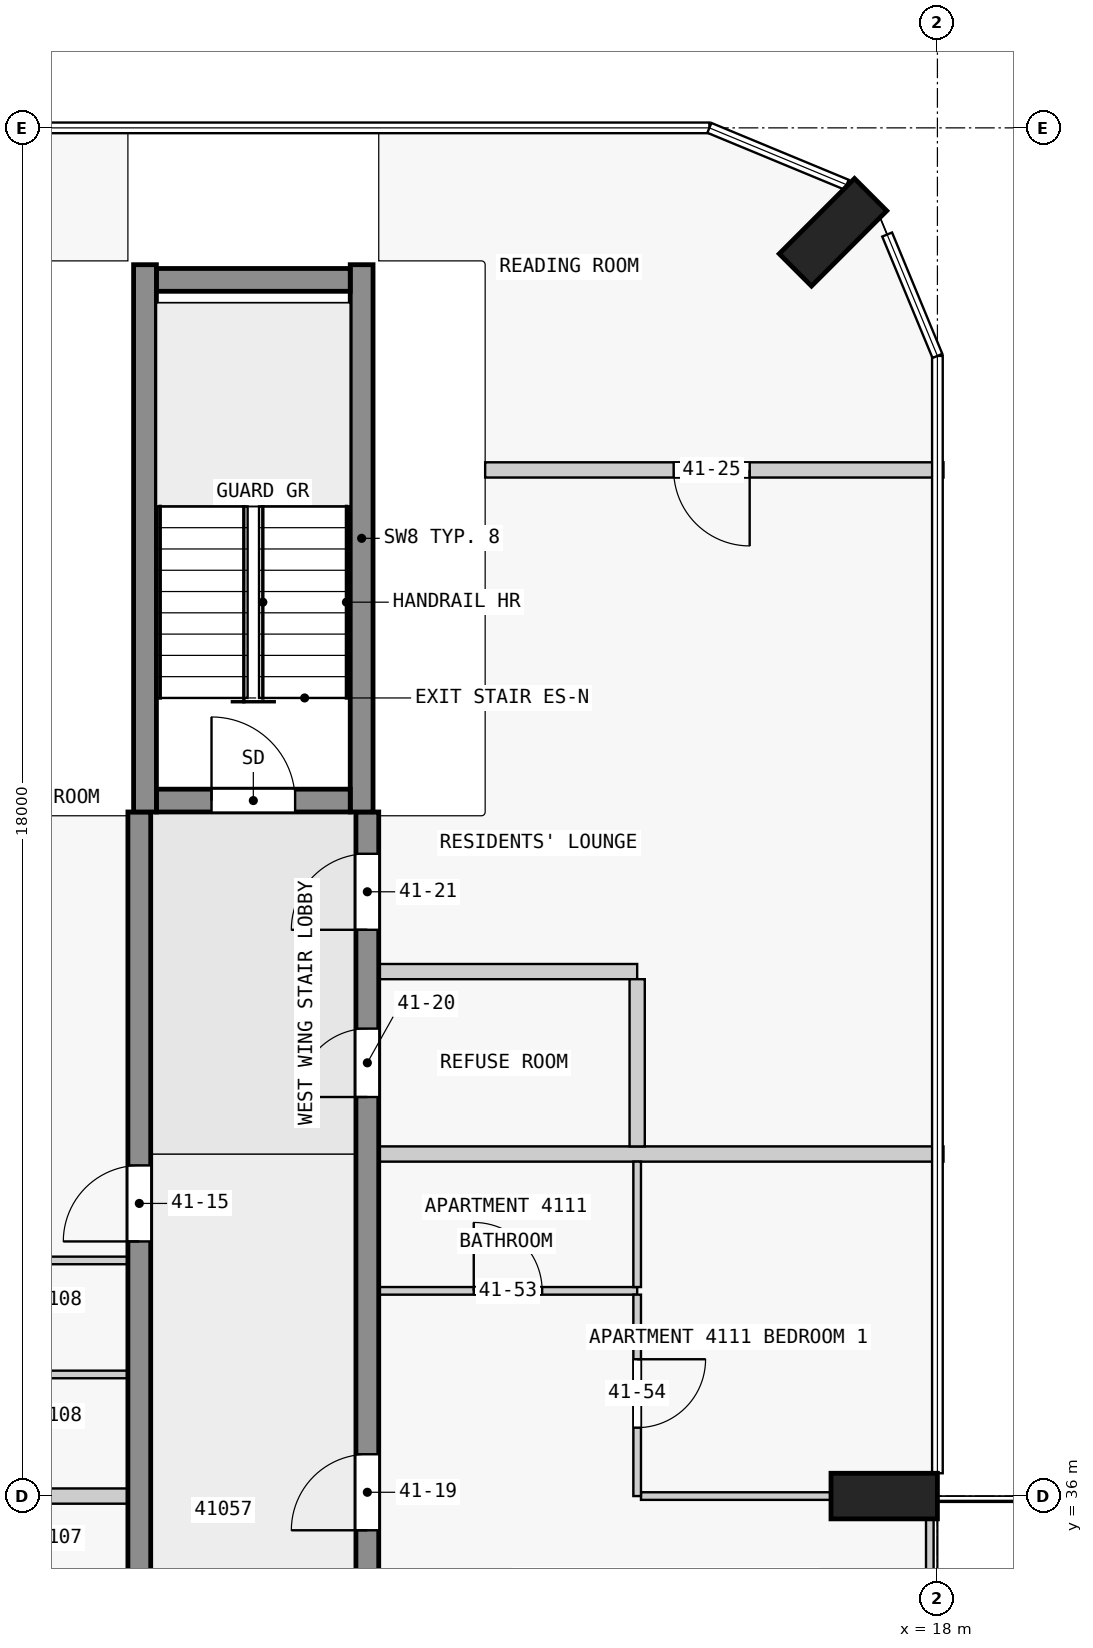
"""IFC4 building model, lengths in metres.
Left out: names, types, materials, properties, quantities, classifications, styles, units other than length and angle.
Written with IfcOpenShell. Run it as: python <this file> out.ifc"""

import sys

from ifc_helpers import new_model, si_unit, direction, frame, frame_2d, origin, origin_2d, place, context, subcontext, project, spatial, rectangle, extrude, element, fill, save


model = new_model("IFC4")
c1 = context("Model", 3, precision=1e-05, world=origin(), true_north=direction((0.0, 1.0)))
c2 = subcontext(c1, "Body", "Model", "MODEL_VIEW")
j1 = project(units=[si_unit("LENGTHUNIT", "METRE"), si_unit("PLANEANGLEUNIT", "RADIAN")], contexts=[c1])
p1 = place(None, origin())
s1 = spatial("IfcSite", under=j1, at=p1, CompositionType="ELEMENT")
p2 = place(p1, origin())
s2 = spatial("IfcBuilding", under=s1, at=p2, CompositionType="ELEMENT")
p3 = place(p2, frame((0.0, 0.0, 160.4)))
s3 = spatial("IfcBuildingStorey", under=s2, at=p3, CompositionType="ELEMENT", Elevation=160.4)
for number, where, z_axis, x_axis in (
    (1, (17.3, 36.0, 0.0), (0.0, 0.0, 1.0), (0.0, 1.0, 0.0)),
    (2, (16.626, 52.626, 0.0), (0.0, 0.0, 1.0), (-0.707, 0.707, 0.0)),
):
    element("IfcColumn", number, at=place(p3, frame(where, z_axis=z_axis, x_axis=x_axis)), inside=s3, PredefinedType="COLUMN", context=c2, shape_type="SweptSolid", body=[
        extrude(rectangle(XDim=0.6, YDim=1.4, at=origin_2d()), origin(), (0.0, 0.0, 1.0), 3.5),
    ])
p4 = place(p3, frame((7.725, 45.15, 0.0), z_axis=(0.0, 0.0, 1.0), x_axis=(1.0, 0.0, 0.0)))
e3 = element("IfcWall", 3, at=p4, inside=s3, PredefinedType="SHEAR", context=c2, shape_type="SweptSolid", body=[
    extrude(rectangle(XDim=2.55, YDim=0.3, at=frame_2d((1.275, 0.0))), origin(), (0.0, 0.0, 1.0), 3.5),
])
p5 = place(p4, frame((0.725, 0.0, 0.0)))
e4 = element("IfcOpeningElement", 4, at=p5, cuts=e3, PredefinedType="OPENING", context=c2, shape_type="SweptSolid", body=[
    extrude(rectangle(XDim=1.1, YDim=2.1, at=frame_2d((0.55, 1.05))), frame((0.0, 0.16, 0.0), z_axis=(0.0, -1.0, 0.0), x_axis=(1.0, 0.0, 0.0)), (0.0, 0.0, 1.0), 0.32),
])
p6 = place(p3, frame((7.725, 52.0, 0.0), z_axis=(0.0, 0.0, 1.0), x_axis=(1.0, 0.0, 0.0)))
e5 = element("IfcWall", 5, at=p6, inside=s3, PredefinedType="SHEAR", context=c2, shape_type="SweptSolid", body=[
    extrude(rectangle(XDim=2.55, YDim=0.3, at=frame_2d((1.275, 0.0))), origin(), (0.0, 0.0, 1.0), 3.5),
])
for number, where, z_axis, x_axis in (
    (6, (7.575, 45.0, 0.0), (0.0, 0.0, 1.0), (0.0, 1.0, 0.0)),
    (7, (10.425, 45.0, 0.0), (0.0, 0.0, 1.0), (0.0, 1.0, 0.0)),
):
    element("IfcWall", number, at=place(p3, frame(where, z_axis=z_axis, x_axis=x_axis)), inside=s3, PredefinedType="SHEAR", context=c2, shape_type="SweptSolid", body=[
        extrude(rectangle(XDim=7.2, YDim=0.3, at=frame_2d((3.6, 0.0))), origin(), (0.0, 0.0, 1.0), 3.5),
    ])
p7 = place(p3, frame((7.5, 18.0, 0.0), z_axis=(0.0, 0.0, 1.0), x_axis=(0.0, 1.0, 0.0)))
e8 = element("IfcWall", 8, at=p7, inside=s3, PredefinedType="SHEAR", context=c2, shape_type="SweptSolid", body=[
    extrude(rectangle(XDim=27.0, YDim=0.3, at=frame_2d((13.5, 0.0))), origin(), (0.0, 0.0, 1.0), 3.25),
])
p8 = place(p7, frame((1.75, 0.0, 0.0)))
e9 = element("IfcOpeningElement", 9, at=p8, cuts=e8, PredefinedType="OPENING", context=c2, shape_type="SweptSolid", body=[
    extrude(rectangle(XDim=1.0, YDim=2.1, at=frame_2d((0.5, 1.05))), frame((0.0, 0.16, 0.0), z_axis=(0.0, -1.0, 0.0), x_axis=(1.0, 0.0, 0.0)), (0.0, 0.0, 1.0), 0.32),
])
p9 = place(p7, frame((6.25, 0.0, 0.0)))
e10 = element("IfcOpeningElement", 10, at=p9, cuts=e8, PredefinedType="OPENING", context=c2, shape_type="SweptSolid", body=[
    extrude(rectangle(XDim=1.0, YDim=2.1, at=frame_2d((0.5, 1.05))), frame((0.0, 0.16, 0.0), z_axis=(0.0, -1.0, 0.0), x_axis=(1.0, 0.0, 0.0)), (0.0, 0.0, 1.0), 0.32),
])
p10 = place(p7, frame((10.75, 0.0, 0.0)))
e11 = element("IfcOpeningElement", 11, at=p10, cuts=e8, PredefinedType="OPENING", context=c2, shape_type="SweptSolid", body=[
    extrude(rectangle(XDim=1.0, YDim=2.1, at=frame_2d((0.5, 1.05))), frame((0.0, 0.16, 0.0), z_axis=(0.0, -1.0, 0.0), x_axis=(1.0, 0.0, 0.0)), (0.0, 0.0, 1.0), 0.32),
])
p11 = place(p7, frame((15.25, 0.0, 0.0)))
e12 = element("IfcOpeningElement", 12, at=p11, cuts=e8, PredefinedType="OPENING", context=c2, shape_type="SweptSolid", body=[
    extrude(rectangle(XDim=1.0, YDim=2.1, at=frame_2d((0.5, 1.05))), frame((0.0, 0.16, 0.0), z_axis=(0.0, -1.0, 0.0), x_axis=(1.0, 0.0, 0.0)), (0.0, 0.0, 1.0), 0.32),
])
p12 = place(p7, frame((21.35, 0.0, 0.0)))
e13 = element("IfcOpeningElement", 13, at=p12, cuts=e8, PredefinedType="OPENING", context=c2, shape_type="SweptSolid", body=[
    extrude(rectangle(XDim=1.0, YDim=2.1, at=frame_2d((0.5, 1.05))), frame((0.0, 0.16, 0.0), z_axis=(0.0, -1.0, 0.0), x_axis=(1.0, 0.0, 0.0)), (0.0, 0.0, 1.0), 0.32),
])
p13 = place(p3, frame((10.5, 18.0, 0.0), z_axis=(0.0, 0.0, 1.0), x_axis=(0.0, 1.0, 0.0)))
e14 = element("IfcWall", 14, at=p13, inside=s3, PredefinedType="SHEAR", context=c2, shape_type="SweptSolid", body=[
    extrude(rectangle(XDim=27.0, YDim=0.3, at=frame_2d((13.5, 0.0))), origin(), (0.0, 0.0, 1.0), 3.25),
])
p14 = place(p13, frame((1.75, 0.0, 0.0)))
e15 = element("IfcOpeningElement", 15, at=p14, cuts=e14, PredefinedType="OPENING", context=c2, shape_type="SweptSolid", body=[
    extrude(rectangle(XDim=1.0, YDim=2.1, at=frame_2d((0.5, 1.05))), frame((0.0, 0.16, 0.0), z_axis=(0.0, -1.0, 0.0), x_axis=(1.0, 0.0, 0.0)), (0.0, 0.0, 1.0), 0.32),
])
p15 = place(p13, frame((6.25, 0.0, 0.0)))
e16 = element("IfcOpeningElement", 16, at=p15, cuts=e14, PredefinedType="OPENING", context=c2, shape_type="SweptSolid", body=[
    extrude(rectangle(XDim=1.0, YDim=2.1, at=frame_2d((0.5, 1.05))), frame((0.0, 0.16, 0.0), z_axis=(0.0, -1.0, 0.0), x_axis=(1.0, 0.0, 0.0)), (0.0, 0.0, 1.0), 0.32),
])
p16 = place(p13, frame((10.35, 0.0, 0.0)))
e17 = element("IfcOpeningElement", 17, at=p16, cuts=e14, PredefinedType="OPENING", context=c2, shape_type="SweptSolid", body=[
    extrude(rectangle(XDim=1.8, YDim=2.1, at=frame_2d((0.9, 1.05))), frame((0.0, 0.16, 0.0), z_axis=(0.0, -1.0, 0.0), x_axis=(1.0, 0.0, 0.0)), (0.0, 0.0, 1.0), 0.32),
])
p17 = place(p13, frame((17.55, 0.0, 0.0)))
e18 = element("IfcOpeningElement", 18, at=p17, cuts=e14, PredefinedType="OPENING", context=c2, shape_type="SweptSolid", body=[
    extrude(rectangle(XDim=1.0, YDim=2.1, at=frame_2d((0.5, 1.05))), frame((0.0, 0.16, 0.0), z_axis=(0.0, -1.0, 0.0), x_axis=(1.0, 0.0, 0.0)), (0.0, 0.0, 1.0), 0.32),
])
p18 = place(p13, frame((23.25, 0.0, 0.0)))
e19 = element("IfcOpeningElement", 19, at=p18, cuts=e14, PredefinedType="OPENING", context=c2, shape_type="SweptSolid", body=[
    extrude(rectangle(XDim=0.9, YDim=2.1, at=frame_2d((0.45, 1.05))), frame((0.0, 0.16, 0.0), z_axis=(0.0, -1.0, 0.0), x_axis=(1.0, 0.0, 0.0)), (0.0, 0.0, 1.0), 0.32),
])
p19 = place(p13, frame((25.45, 0.0, 0.0)))
e20 = element("IfcOpeningElement", 20, at=p19, cuts=e14, PredefinedType="OPENING", context=c2, shape_type="SweptSolid", body=[
    extrude(rectangle(XDim=1.0, YDim=2.1, at=frame_2d((0.5, 1.05))), frame((0.0, 0.16, 0.0), z_axis=(0.0, -1.0, 0.0), x_axis=(1.0, 0.0, 0.0)), (0.0, 0.0, 1.0), 0.32),
])
p20 = place(p3, frame((17.9, 36.0, 0.0), z_axis=(0.0, 0.0, 1.0), x_axis=(0.0, -1.0, 0.0)))
e21 = element("IfcWall", 21, at=p20, inside=s3, PredefinedType="STANDARD", context=c2, shape_type="SweptSolid", body=[
    extrude(rectangle(XDim=4.5, YDim=0.1, at=frame_2d((2.25, 0.0))), origin(), (0.0, 0.0, 1.0), 3.25),
])
p21 = place(p20, frame((1.05, 0.0, 0.0)))
e22 = element("IfcOpeningElement", 22, at=p21, cuts=e21, PredefinedType="OPENING", context=c2, shape_type="SweptSolid", body=[
    extrude(rectangle(XDim=2.4, YDim=2.4, at=frame_2d((1.2, 1.2))), frame((0.0, 0.06, 0.0), z_axis=(0.0, -1.0, 0.0), x_axis=(1.0, 0.0, 0.0)), (0.0, 0.0, 1.0), 0.12),
])
p22 = place(p3, frame((14.1, 36.0, 0.0), z_axis=(0.0, 0.0, 1.0), x_axis=(1.0, 0.0, 0.0)))
e23 = element("IfcWall", 23, at=p22, inside=s3, PredefinedType="PARTITIONING", context=c2, shape_type="SweptSolid", body=[
    extrude(rectangle(XDim=2.5, YDim=0.1, at=frame_2d((1.25, 0.0))), origin(), (0.0, 0.0, 1.0), 3.25),
])
p23 = place(p3, frame((7.35, 36.0, 0.0), z_axis=(0.0, 0.0, 1.0), x_axis=(-1.0, 0.0, 0.0)))
e24 = element("IfcWall", 24, at=p23, inside=s3, PredefinedType="PARTITIONING", context=c2, shape_type="SweptSolid", body=[
    extrude(rectangle(XDim=3.4, YDim=0.2, at=frame_2d((1.7, 0.0))), origin(), (0.0, 0.0, 1.0), 3.25),
])
p24 = place(p3, frame((7.35, 37.6, 0.0), z_axis=(0.0, 0.0, 1.0), x_axis=(-1.0, 0.0, 0.0)))
e25 = element("IfcWall", 25, at=p24, inside=s3, PredefinedType="PARTITIONING", context=c2, shape_type="SweptSolid", body=[
    extrude(rectangle(XDim=3.35, YDim=0.1, at=frame_2d((1.675, 0.0))), origin(), (0.0, 0.0, 1.0), 3.25),
])
p25 = place(p3, frame((10.65, 38.7, 0.0), z_axis=(0.0, 0.0, 1.0), x_axis=(1.0, 0.0, 0.0)))
e26 = element("IfcWall", 26, at=p25, inside=s3, PredefinedType="PARTITIONING", context=c2, shape_type="SweptSolid", body=[
    extrude(rectangle(XDim=3.4, YDim=0.1, at=frame_2d((1.7, 0.0))), origin(), (0.0, 0.0, 1.0), 3.25),
])
p26 = place(p25, frame((1.25, 0.0, 0.0)))
e27 = element("IfcOpeningElement", 27, at=p26, cuts=e26, PredefinedType="OPENING", context=c2, shape_type="SweptSolid", body=[
    extrude(rectangle(XDim=0.9, YDim=2.1, at=frame_2d((0.45, 1.05))), frame((0.0, 0.06, 0.0), z_axis=(0.0, -1.0, 0.0), x_axis=(1.0, 0.0, 0.0)), (0.0, 0.0, 1.0), 0.12),
])
p27 = place(p3, frame((7.35, 39.1, 0.0), z_axis=(0.0, 0.0, 1.0), x_axis=(-1.0, 0.0, 0.0)))
e28 = element("IfcWall", 28, at=p27, inside=s3, PredefinedType="PARTITIONING", context=c2, shape_type="SweptSolid", body=[
    extrude(rectangle(XDim=3.35, YDim=0.1, at=frame_2d((1.675, 0.0))), origin(), (0.0, 0.0, 1.0), 3.25),
])
p28 = place(p27, frame((1.25, 0.0, 0.0)))
e29 = element("IfcOpeningElement", 29, at=p28, cuts=e28, PredefinedType="OPENING", context=c2, shape_type="SweptSolid", body=[
    extrude(rectangle(XDim=0.9, YDim=2.1, at=frame_2d((0.45, 1.05))), frame((0.0, 0.06, 0.0), z_axis=(0.0, -1.0, 0.0), x_axis=(1.0, 0.0, 0.0)), (0.0, 0.0, 1.0), 0.12),
])
p29 = place(p3, frame((18.08, 40.5, 0.0), z_axis=(0.0, 0.0, 1.0), x_axis=(-1.0, 0.0, 0.0)))
e30 = element("IfcWall", 30, at=p29, inside=s3, PredefinedType="PARTITIONING", context=c2, shape_type="SweptSolid", body=[
    extrude(rectangle(XDim=7.43, YDim=0.2, at=frame_2d((3.715, 0.0))), origin(), (0.0, 0.0, 1.0), 3.25),
])
p30 = place(p3, frame((14.05, 42.9, 0.0), z_axis=(0.0, 0.0, 1.0), x_axis=(-1.0, 0.0, 0.0)))
e31 = element("IfcWall", 31, at=p30, inside=s3, PredefinedType="PARTITIONING", context=c2, shape_type="SweptSolid", body=[
    extrude(rectangle(XDim=3.4, YDim=0.2, at=frame_2d((1.7, 0.0))), origin(), (0.0, 0.0, 1.0), 3.25),
])
p31 = place(p3, frame((18.08, 49.5, 0.0), z_axis=(0.0, 0.0, 1.0), x_axis=(-1.0, 0.0, 0.0)))
e32 = element("IfcWall", 32, at=p31, inside=s3, PredefinedType="PARTITIONING", context=c2, shape_type="SweptSolid", body=[
    extrude(rectangle(XDim=6.03, YDim=0.2, at=frame_2d((3.015, 0.0))), origin(), (0.0, 0.0, 1.0), 3.25),
])
p32 = place(p31, frame((2.55, 0.0, 0.0)))
e33 = element("IfcOpeningElement", 33, at=p32, cuts=e32, PredefinedType="OPENING", context=c2, shape_type="SweptSolid", body=[
    extrude(rectangle(XDim=1.0, YDim=2.1, at=frame_2d((0.5, 1.05))), frame((0.0, 0.11, 0.0), z_axis=(0.0, -1.0, 0.0), x_axis=(1.0, 0.0, 0.0)), (0.0, 0.0, 1.0), 0.22),
])
p33 = place(p3, frame((14.05, 38.65, 0.0), z_axis=(0.0, 0.0, 1.0), x_axis=(0.0, -1.0, 0.0)))
e34 = element("IfcWall", 34, at=p33, inside=s3, PredefinedType="PARTITIONING", context=c2, shape_type="SweptSolid", body=[
    extrude(rectangle(XDim=2.65, YDim=0.1, at=frame_2d((1.325, 0.0))), origin(), (0.0, 0.0, 1.0), 3.25),
])
p34 = place(p33, frame((0.85, 0.0, 0.0)))
e35 = element("IfcOpeningElement", 35, at=p34, cuts=e34, PredefinedType="OPENING", context=c2, shape_type="SweptSolid", body=[
    extrude(rectangle(XDim=0.9, YDim=2.1, at=frame_2d((0.45, 1.05))), frame((0.0, 0.06, 0.0), z_axis=(0.0, -1.0, 0.0), x_axis=(1.0, 0.0, 0.0)), (0.0, 0.0, 1.0), 0.12),
])
p35 = place(p3, frame((14.05, 38.75, 0.0), z_axis=(0.0, 0.0, 1.0), x_axis=(0.0, 1.0, 0.0)))
e36 = element("IfcWall", 36, at=p35, inside=s3, PredefinedType="PARTITIONING", context=c2, shape_type="SweptSolid", body=[
    extrude(rectangle(XDim=1.65, YDim=0.1, at=frame_2d((0.825, 0.0))), origin(), (0.0, 0.0, 1.0), 3.25),
])
p36 = place(p3, frame((14.05, 40.6, 0.0), z_axis=(0.0, 0.0, 1.0), x_axis=(0.0, 1.0, 0.0)))
e37 = element("IfcWall", 37, at=p36, inside=s3, PredefinedType="PARTITIONING", context=c2, shape_type="SweptSolid", body=[
    extrude(rectangle(XDim=2.2, YDim=0.2, at=frame_2d((1.1, 0.0))), origin(), (0.0, 0.0, 1.0), 3.25),
])
p37 = place(p5, origin())
e38 = element("IfcDoor", 38, at=p37, inside=s3, OperationType="SINGLE_SWING_LEFT", PredefinedType="DOOR", context=c2, shape_type="SweptSolid", body=[
    extrude(rectangle(XDim=1.1, YDim=2.1, at=frame_2d((0.55, 1.05))), frame((0.0, 0.025, 0.0), z_axis=(0.0, -1.0, 0.0), x_axis=(1.0, 0.0, 0.0)), (0.0, 0.0, 1.0), 0.05),
])
fill(e4, e38)
p38 = place(p12, origin())
e39 = element("IfcDoor", 39, at=p38, inside=s3, OperationType="SINGLE_SWING_RIGHT", PredefinedType="DOOR", context=c2, shape_type="SweptSolid", body=[
    extrude(rectangle(XDim=1.0, YDim=2.1, at=frame_2d((0.5, 1.05))), frame((0.0, 0.025, 0.0), z_axis=(0.0, -1.0, 0.0), x_axis=(1.0, 0.0, 0.0)), (0.0, 0.0, 1.0), 0.05),
])
fill(e13, e39)
p39 = place(p17, origin())
e40 = element("IfcDoor", 40, at=p39, inside=s3, OperationType="SINGLE_SWING_RIGHT", PredefinedType="DOOR", context=c2, shape_type="SweptSolid", body=[
    extrude(rectangle(XDim=1.0, YDim=2.1, at=frame_2d((0.5, 1.05))), frame((0.0, 0.025, 0.0), z_axis=(0.0, -1.0, 0.0), x_axis=(1.0, 0.0, 0.0)), (0.0, 0.0, 1.0), 0.05),
])
fill(e18, e40)
p40 = place(p18, origin())
e41 = element("IfcDoor", 41, at=p40, inside=s3, OperationType="SINGLE_SWING_RIGHT", PredefinedType="DOOR", context=c2, shape_type="SweptSolid", body=[
    extrude(rectangle(XDim=0.9, YDim=2.1, at=frame_2d((0.45, 1.05))), frame((0.0, 0.025, 0.0), z_axis=(0.0, -1.0, 0.0), x_axis=(1.0, 0.0, 0.0)), (0.0, 0.0, 1.0), 0.05),
])
fill(e19, e41)
p41 = place(p19, origin())
e42 = element("IfcDoor", 42, at=p41, inside=s3, OperationType="SINGLE_SWING_RIGHT", PredefinedType="DOOR", context=c2, shape_type="SweptSolid", body=[
    extrude(rectangle(XDim=1.0, YDim=2.1, at=frame_2d((0.5, 1.05))), frame((0.0, 0.025, 0.0), z_axis=(0.0, -1.0, 0.0), x_axis=(1.0, 0.0, 0.0)), (0.0, 0.0, 1.0), 0.05),
])
fill(e20, e42)
p42 = place(p32, origin())
e43 = element("IfcDoor", 43, at=p42, inside=s3, OperationType="SINGLE_SWING_RIGHT", PredefinedType="DOOR", context=c2, shape_type="SweptSolid", body=[
    extrude(rectangle(XDim=1.0, YDim=2.1, at=frame_2d((0.5, 1.05))), frame((0.0, 0.025, 0.0), z_axis=(0.0, -1.0, 0.0), x_axis=(1.0, 0.0, 0.0)), (0.0, 0.0, 1.0), 0.05),
])
fill(e33, e43)
p43 = place(p26, origin())
e44 = element("IfcDoor", 44, at=p43, inside=s3, OperationType="SINGLE_SWING_LEFT", PredefinedType="DOOR", context=c2, shape_type="SweptSolid", body=[
    extrude(rectangle(XDim=0.9, YDim=2.1, at=frame_2d((0.45, 1.05))), frame((0.0, 0.025, 0.0), z_axis=(0.0, -1.0, 0.0), x_axis=(1.0, 0.0, 0.0)), (0.0, 0.0, 1.0), 0.05),
])
fill(e27, e44)
p44 = place(p34, origin())
e45 = element("IfcDoor", 45, at=p44, inside=s3, OperationType="SINGLE_SWING_LEFT", PredefinedType="DOOR", context=c2, shape_type="SweptSolid", body=[
    extrude(rectangle(XDim=0.9, YDim=2.1, at=frame_2d((0.45, 1.05))), frame((0.0, 0.025, 0.0), z_axis=(0.0, -1.0, 0.0), x_axis=(1.0, 0.0, 0.0)), (0.0, 0.0, 1.0), 0.05),
])
fill(e35, e45)
save(model, sys.argv[1])
